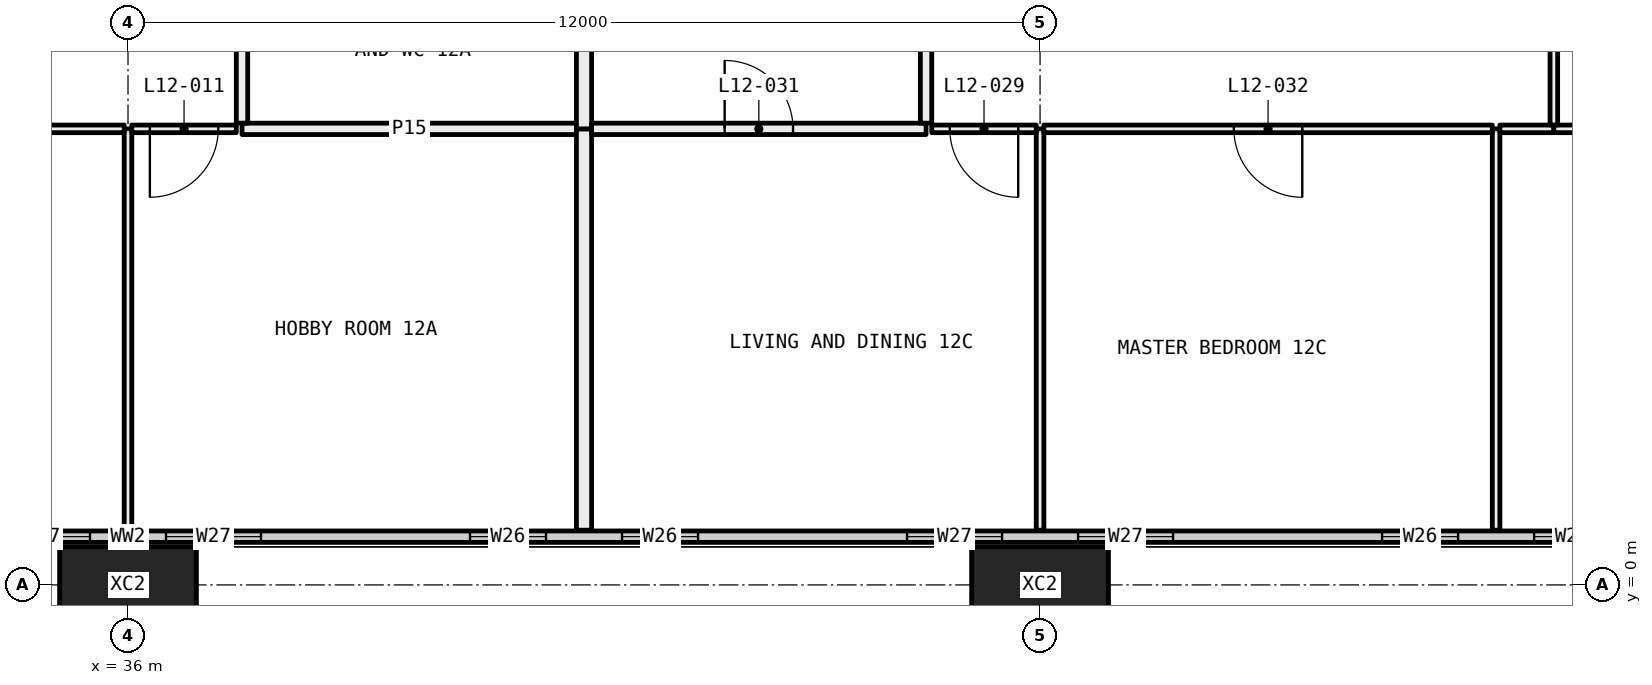
"""IFC4 building model, lengths in metres.
Left out: names, types, materials, properties, quantities, classifications, styles, units other than length and angle.
Written with IfcOpenShell. Run it as: python <this file> out.ifc"""

import sys

from ifc_helpers import new_model, si_unit, direction, frame, frame_2d, origin, origin_2d, place, context, subcontext, project, spatial, rectangle, hollow_rectangle, extrude, element, fill, save


model = new_model("IFC4")
c1 = context("Model", 3, precision=1e-05, world=origin(), true_north=direction((0.0, 1.0)))
c2 = subcontext(c1, "Body", "Model", "MODEL_VIEW")
j1 = project(units=[si_unit("LENGTHUNIT", "METRE"), si_unit("PLANEANGLEUNIT", "RADIAN")], contexts=[c1])
p1 = place(None, origin())
s1 = spatial("IfcSite", under=j1, at=p1, CompositionType="ELEMENT")
p2 = place(p1, origin())
s2 = spatial("IfcBuilding", under=s1, at=p2, CompositionType="ELEMENT")
p3 = place(p2, frame((0.0, 0.0, 54.15)))
s3 = spatial("IfcBuildingStorey", under=s2, at=p3, CompositionType="ELEMENT", Elevation=54.15)
for number, where, z_axis, x_axis in (
    (1, (36.0, 0.0, -0.4), (0.0, 0.0, 1.0), (1.0, 0.0, 0.0)),
    (2, (48.0, 0.0, -0.4), (0.0, 0.0, 1.0), (1.0, 0.0, 0.0)),
):
    element("IfcColumn", number, at=place(p3, frame(where, z_axis=z_axis, x_axis=x_axis)), inside=s3, PredefinedType="COLUMN", context=c2, shape_type="SweptSolid", body=[
        extrude(hollow_rectangle(XDim=1.8, YDim=1.0, WallThickness=0.07, at=origin_2d()), origin(), (0.0, 0.0, 1.0), 3.45),
    ])
p4 = place(p3, frame((6.56, 0.635, 0.0), z_axis=(0.0, 0.0, 1.0), x_axis=(1.0, 0.0, 0.0)))
e3 = element("IfcWall", 3, at=p4, inside=s3, PredefinedType="ELEMENTEDWALL", context=c2, shape_type="SweptSolid", body=[
    extrude(rectangle(XDim=58.88, YDim=0.15, at=frame_2d((29.44, 0.0))), origin(), (0.0, 0.0, 1.0), 3.05),
])
p5 = place(p4, frame((0.44, 0.0, 0.45)))
e4 = element("IfcOpeningElement", 4, at=p5, cuts=e3, PredefinedType="OPENING", context=c2, shape_type="SweptSolid", body=[
    extrude(rectangle(XDim=4.5, YDim=2.55, at=frame_2d((2.25, 1.275))), frame((0.0, 0.085, 0.0), z_axis=(0.0, -1.0, 0.0), x_axis=(1.0, 0.0, 0.0)), (0.0, 0.0, 1.0), 0.17),
])
p6 = place(p4, frame((5.94, 0.0, 0.45)))
e5 = element("IfcOpeningElement", 5, at=p6, cuts=e3, PredefinedType="OPENING", context=c2, shape_type="SweptSolid", body=[
    extrude(rectangle(XDim=1.25, YDim=2.55, at=frame_2d((0.625, 1.275))), frame((0.0, 0.085, 0.0), z_axis=(0.0, -1.0, 0.0), x_axis=(1.0, 0.0, 0.0)), (0.0, 0.0, 1.0), 0.17),
])
p7 = place(p4, frame((9.94, 0.0, 0.45)))
e6 = element("IfcOpeningElement", 6, at=p7, cuts=e3, PredefinedType="OPENING", context=c2, shape_type="SweptSolid", body=[
    extrude(rectangle(XDim=1.0, YDim=2.55, at=frame_2d((0.5, 1.275))), frame((0.0, 0.085, 0.0), z_axis=(0.0, -1.0, 0.0), x_axis=(1.0, 0.0, 0.0)), (0.0, 0.0, 1.0), 0.17),
])
p8 = place(p4, frame((11.94, 0.0, 0.45)))
e7 = element("IfcOpeningElement", 7, at=p8, cuts=e3, PredefinedType="OPENING", context=c2, shape_type="SweptSolid", body=[
    extrude(rectangle(XDim=1.0, YDim=2.55, at=frame_2d((0.5, 1.275))), frame((0.0, 0.085, 0.0), z_axis=(0.0, -1.0, 0.0), x_axis=(1.0, 0.0, 0.0)), (0.0, 0.0, 1.0), 0.17),
])
p9 = place(p4, frame((15.69, 0.0, 0.45)))
e8 = element("IfcOpeningElement", 8, at=p9, cuts=e3, PredefinedType="OPENING", context=c2, shape_type="SweptSolid", body=[
    extrude(rectangle(XDim=1.25, YDim=2.55, at=frame_2d((0.625, 1.275))), frame((0.0, 0.085, 0.0), z_axis=(0.0, -1.0, 0.0), x_axis=(1.0, 0.0, 0.0)), (0.0, 0.0, 1.0), 0.17),
])
p10 = place(p4, frame((17.94, 0.0, 0.45)))
e9 = element("IfcOpeningElement", 9, at=p10, cuts=e3, PredefinedType="OPENING", context=c2, shape_type="SweptSolid", body=[
    extrude(rectangle(XDim=1.25, YDim=2.55, at=frame_2d((0.625, 1.275))), frame((0.0, 0.085, 0.0), z_axis=(0.0, -1.0, 0.0), x_axis=(1.0, 0.0, 0.0)), (0.0, 0.0, 1.0), 0.17),
])
p11 = place(p4, frame((21.94, 0.0, 0.45)))
e10 = element("IfcOpeningElement", 10, at=p11, cuts=e3, PredefinedType="OPENING", context=c2, shape_type="SweptSolid", body=[
    extrude(rectangle(XDim=1.0, YDim=2.55, at=frame_2d((0.5, 1.275))), frame((0.0, 0.085, 0.0), z_axis=(0.0, -1.0, 0.0), x_axis=(1.0, 0.0, 0.0)), (0.0, 0.0, 1.0), 0.17),
])
p12 = place(p4, frame((23.94, 0.0, 0.45)))
e11 = element("IfcOpeningElement", 11, at=p12, cuts=e3, PredefinedType="OPENING", context=c2, shape_type="SweptSolid", body=[
    extrude(rectangle(XDim=1.0, YDim=2.55, at=frame_2d((0.5, 1.275))), frame((0.0, 0.085, 0.0), z_axis=(0.0, -1.0, 0.0), x_axis=(1.0, 0.0, 0.0)), (0.0, 0.0, 1.0), 0.17),
])
p13 = place(p4, frame((27.69, 0.0, 0.45)))
e12 = element("IfcOpeningElement", 12, at=p13, cuts=e3, PredefinedType="OPENING", context=c2, shape_type="SweptSolid", body=[
    extrude(rectangle(XDim=1.25, YDim=2.55, at=frame_2d((0.625, 1.275))), frame((0.0, 0.085, 0.0), z_axis=(0.0, -1.0, 0.0), x_axis=(1.0, 0.0, 0.0)), (0.0, 0.0, 1.0), 0.17),
])
p14 = place(p4, frame((29.94, 0.0, 0.45)))
e13 = element("IfcOpeningElement", 13, at=p14, cuts=e3, PredefinedType="OPENING", context=c2, shape_type="SweptSolid", body=[
    extrude(rectangle(XDim=1.25, YDim=2.55, at=frame_2d((0.625, 1.275))), frame((0.0, 0.085, 0.0), z_axis=(0.0, -1.0, 0.0), x_axis=(1.0, 0.0, 0.0)), (0.0, 0.0, 1.0), 0.17),
])
p15 = place(p4, frame((33.94, 0.0, 0.45)))
e14 = element("IfcOpeningElement", 14, at=p15, cuts=e3, PredefinedType="OPENING", context=c2, shape_type="SweptSolid", body=[
    extrude(rectangle(XDim=1.0, YDim=2.55, at=frame_2d((0.5, 1.275))), frame((0.0, 0.085, 0.0), z_axis=(0.0, -1.0, 0.0), x_axis=(1.0, 0.0, 0.0)), (0.0, 0.0, 1.0), 0.17),
])
p16 = place(p4, frame((35.94, 0.0, 0.45)))
e15 = element("IfcOpeningElement", 15, at=p16, cuts=e3, PredefinedType="OPENING", context=c2, shape_type="SweptSolid", body=[
    extrude(rectangle(XDim=1.0, YDim=2.55, at=frame_2d((0.5, 1.275))), frame((0.0, 0.085, 0.0), z_axis=(0.0, -1.0, 0.0), x_axis=(1.0, 0.0, 0.0)), (0.0, 0.0, 1.0), 0.17),
])
p17 = place(p4, frame((39.69, 0.0, 0.45)))
e16 = element("IfcOpeningElement", 16, at=p17, cuts=e3, PredefinedType="OPENING", context=c2, shape_type="SweptSolid", body=[
    extrude(rectangle(XDim=1.25, YDim=2.55, at=frame_2d((0.625, 1.275))), frame((0.0, 0.085, 0.0), z_axis=(0.0, -1.0, 0.0), x_axis=(1.0, 0.0, 0.0)), (0.0, 0.0, 1.0), 0.17),
])
p18 = place(p4, frame((41.94, 0.0, 0.45)))
e17 = element("IfcOpeningElement", 17, at=p18, cuts=e3, PredefinedType="OPENING", context=c2, shape_type="SweptSolid", body=[
    extrude(rectangle(XDim=1.25, YDim=2.55, at=frame_2d((0.625, 1.275))), frame((0.0, 0.085, 0.0), z_axis=(0.0, -1.0, 0.0), x_axis=(1.0, 0.0, 0.0)), (0.0, 0.0, 1.0), 0.17),
])
p19 = place(p4, frame((45.94, 0.0, 0.45)))
e18 = element("IfcOpeningElement", 18, at=p19, cuts=e3, PredefinedType="OPENING", context=c2, shape_type="SweptSolid", body=[
    extrude(rectangle(XDim=1.0, YDim=2.55, at=frame_2d((0.5, 1.275))), frame((0.0, 0.085, 0.0), z_axis=(0.0, -1.0, 0.0), x_axis=(1.0, 0.0, 0.0)), (0.0, 0.0, 1.0), 0.17),
])
p20 = place(p4, frame((47.94, 0.0, 0.45)))
e19 = element("IfcOpeningElement", 19, at=p20, cuts=e3, PredefinedType="OPENING", context=c2, shape_type="SweptSolid", body=[
    extrude(rectangle(XDim=1.0, YDim=2.55, at=frame_2d((0.5, 1.275))), frame((0.0, 0.085, 0.0), z_axis=(0.0, -1.0, 0.0), x_axis=(1.0, 0.0, 0.0)), (0.0, 0.0, 1.0), 0.17),
])
p21 = place(p4, frame((51.69, 0.0, 0.45)))
e20 = element("IfcOpeningElement", 20, at=p21, cuts=e3, PredefinedType="OPENING", context=c2, shape_type="SweptSolid", body=[
    extrude(rectangle(XDim=1.25, YDim=2.55, at=frame_2d((0.625, 1.275))), frame((0.0, 0.085, 0.0), z_axis=(0.0, -1.0, 0.0), x_axis=(1.0, 0.0, 0.0)), (0.0, 0.0, 1.0), 0.17),
])
p22 = place(p4, frame((53.94, 0.0, 0.45)))
e21 = element("IfcOpeningElement", 21, at=p22, cuts=e3, PredefinedType="OPENING", context=c2, shape_type="SweptSolid", body=[
    extrude(rectangle(XDim=4.5, YDim=2.55, at=frame_2d((2.25, 1.275))), frame((0.0, 0.085, 0.0), z_axis=(0.0, -1.0, 0.0), x_axis=(1.0, 0.0, 0.0)), (0.0, 0.0, 1.0), 0.17),
])
p23 = place(p3, frame((36.0, 0.72, 0.0), z_axis=(0.0, 0.0, 1.0), x_axis=(0.0, 1.0, 0.0)))
e22 = element("IfcWall", 22, at=p23, inside=s3, PredefinedType="PARTITIONING", context=c2, shape_type="SweptSolid", body=[
    extrude(rectangle(XDim=5.28, YDim=0.1, at=frame_2d((2.64, 0.0))), origin(), (0.0, 0.0, 1.0), 2.45),
])
p24 = place(p3, frame((35.95, 6.0, 0.0), z_axis=(0.0, 0.0, 1.0), x_axis=(-1.0, 0.0, 0.0)))
e23 = element("IfcWall", 23, at=p24, inside=s3, PredefinedType="PARTITIONING", context=c2, shape_type="SweptSolid", body=[
    extrude(rectangle(XDim=5.9, YDim=0.1, at=frame_2d((2.95, 0.0))), origin(), (0.0, 0.0, 1.0), 2.45),
])
p25 = place(p24, frame((2.5, 0.0, 0.0)))
e24 = element("IfcOpeningElement", 24, at=p25, cuts=e23, PredefinedType="OPENING", context=c2, shape_type="SweptSolid", body=[
    extrude(rectangle(XDim=0.9, YDim=2.1, at=frame_2d((0.45, 1.05))), frame((0.0, 0.06, 0.0), z_axis=(0.0, -1.0, 0.0), x_axis=(1.0, 0.0, 0.0)), (0.0, 0.0, 1.0), 0.12),
])
p26 = place(p3, frame((37.425, 6.0, 0.0), z_axis=(0.0, 0.0, 1.0), x_axis=(-1.0, 0.0, 0.0)))
e25 = element("IfcWall", 25, at=p26, inside=s3, PredefinedType="PARTITIONING", context=c2, shape_type="SweptSolid", body=[
    extrude(rectangle(XDim=1.375, YDim=0.1, at=frame_2d((0.688, 0.0))), origin(), (0.0, 0.0, 1.0), 2.45),
])
p27 = place(p26, frame((0.238, 0.0, 0.0)))
e26 = element("IfcOpeningElement", 26, at=p27, cuts=e25, PredefinedType="OPENING", context=c2, shape_type="SweptSolid", body=[
    extrude(rectangle(XDim=0.9, YDim=2.1, at=frame_2d((0.45, 1.05))), frame((0.0, 0.06, 0.0), z_axis=(0.0, -1.0, 0.0), x_axis=(1.0, 0.0, 0.0)), (0.0, 0.0, 1.0), 0.12),
])
p28 = place(p3, frame((41.9, 6.0, 0.0), z_axis=(0.0, 0.0, 1.0), x_axis=(-1.0, 0.0, 0.0)))
e27 = element("IfcWall", 27, at=p28, inside=s3, PredefinedType="PARTITIONING", context=c2, shape_type="SweptSolid", body=[
    extrude(rectangle(XDim=4.4, YDim=0.15, at=frame_2d((2.2, 0.0))), origin(), (0.0, 0.0, 1.0), 3.05),
])
p29 = place(p3, frame((42.0, 0.72, 0.0), z_axis=(0.0, 0.0, 1.0), x_axis=(0.0, 1.0, 0.0)))
e28 = element("IfcWall", 28, at=p29, inside=s3, PredefinedType="PARTITIONING", context=c2, shape_type="SweptSolid", body=[
    extrude(rectangle(XDim=5.28, YDim=0.2, at=frame_2d((2.64, 0.0))), origin(), (0.0, 0.0, 1.0), 3.05),
])
p30 = place(p3, frame((37.5, 6.075, 0.0), z_axis=(0.0, 0.0, 1.0), x_axis=(0.0, 1.0, 0.0)))
e29 = element("IfcWall", 29, at=p30, inside=s3, PredefinedType="PARTITIONING", context=c2, shape_type="SweptSolid", body=[
    extrude(rectangle(XDim=2.925, YDim=0.15, at=frame_2d((1.462, 0.0))), origin(), (0.0, 0.0, 1.0), 3.05),
])
p31 = place(p30, frame((1.012, 0.0, 0.0)))
e30 = element("IfcOpeningElement", 30, at=p31, cuts=e29, PredefinedType="OPENING", context=c2, shape_type="SweptSolid", body=[
    extrude(rectangle(XDim=0.9, YDim=2.1, at=frame_2d((0.45, 1.05))), frame((0.0, 0.085, 0.0), z_axis=(0.0, -1.0, 0.0), x_axis=(1.0, 0.0, 0.0)), (0.0, 0.0, 1.0), 0.17),
])
p32 = place(p3, frame((42.0, 6.0, 0.0), z_axis=(0.0, 0.0, 1.0), x_axis=(0.0, 1.0, 0.0)))
e31 = element("IfcWall", 31, at=p32, inside=s3, PredefinedType="PARTITIONING", context=c2, shape_type="SweptSolid", body=[
    extrude(rectangle(XDim=3.0, YDim=0.2, at=frame_2d((1.5, 0.0))), origin(), (0.0, 0.0, 1.0), 3.05),
])
p33 = place(p3, frame((48.0, 0.72, 0.0), z_axis=(0.0, 0.0, 1.0), x_axis=(0.0, 1.0, 0.0)))
e32 = element("IfcWall", 32, at=p33, inside=s3, PredefinedType="PARTITIONING", context=c2, shape_type="SweptSolid", body=[
    extrude(rectangle(XDim=5.28, YDim=0.1, at=frame_2d((2.64, 0.0))), origin(), (0.0, 0.0, 1.0), 2.45),
])
p34 = place(p3, frame((46.5, 6.0, 0.0), z_axis=(0.0, 0.0, 1.0), x_axis=(-1.0, 0.0, 0.0)))
e33 = element("IfcWall", 33, at=p34, inside=s3, PredefinedType="PARTITIONING", context=c2, shape_type="SweptSolid", body=[
    extrude(rectangle(XDim=4.4, YDim=0.15, at=frame_2d((2.2, 0.0))), origin(), (0.0, 0.0, 1.0), 3.05),
])
p35 = place(p34, frame((1.75, 0.0, 0.0)))
e34 = element("IfcOpeningElement", 34, at=p35, cuts=e33, PredefinedType="OPENING", context=c2, shape_type="SweptSolid", body=[
    extrude(rectangle(XDim=0.9, YDim=2.1, at=frame_2d((0.45, 1.05))), frame((0.0, 0.085, 0.0), z_axis=(0.0, -1.0, 0.0), x_axis=(1.0, 0.0, 0.0)), (0.0, 0.0, 1.0), 0.17),
])
p36 = place(p3, frame((47.95, 6.0, 0.0), z_axis=(0.0, 0.0, 1.0), x_axis=(-1.0, 0.0, 0.0)))
e35 = element("IfcWall", 35, at=p36, inside=s3, PredefinedType="PARTITIONING", context=c2, shape_type="SweptSolid", body=[
    extrude(rectangle(XDim=1.375, YDim=0.1, at=frame_2d((0.688, 0.0))), origin(), (0.0, 0.0, 1.0), 2.45),
])
p37 = place(p36, frame((0.238, 0.0, 0.0)))
e36 = element("IfcOpeningElement", 36, at=p37, cuts=e35, PredefinedType="OPENING", context=c2, shape_type="SweptSolid", body=[
    extrude(rectangle(XDim=0.9, YDim=2.1, at=frame_2d((0.45, 1.05))), frame((0.0, 0.06, 0.0), z_axis=(0.0, -1.0, 0.0), x_axis=(1.0, 0.0, 0.0)), (0.0, 0.0, 1.0), 0.12),
])
p38 = place(p3, frame((54.0, 0.72, 0.0), z_axis=(0.0, 0.0, 1.0), x_axis=(0.0, 1.0, 0.0)))
e37 = element("IfcWall", 37, at=p38, inside=s3, PredefinedType="PARTITIONING", context=c2, shape_type="SweptSolid", body=[
    extrude(rectangle(XDim=5.28, YDim=0.1, at=frame_2d((2.64, 0.0))), origin(), (0.0, 0.0, 1.0), 3.05),
])
p39 = place(p3, frame((53.95, 6.0, 0.0), z_axis=(0.0, 0.0, 1.0), x_axis=(-1.0, 0.0, 0.0)))
e38 = element("IfcWall", 38, at=p39, inside=s3, PredefinedType="PARTITIONING", context=c2, shape_type="SweptSolid", body=[
    extrude(rectangle(XDim=5.9, YDim=0.1, at=frame_2d((2.95, 0.0))), origin(), (0.0, 0.0, 1.0), 2.45),
])
p40 = place(p39, frame((2.5, 0.0, 0.0)))
e39 = element("IfcOpeningElement", 39, at=p40, cuts=e38, PredefinedType="OPENING", context=c2, shape_type="SweptSolid", body=[
    extrude(rectangle(XDim=0.9, YDim=2.1, at=frame_2d((0.45, 1.05))), frame((0.0, 0.06, 0.0), z_axis=(0.0, -1.0, 0.0), x_axis=(1.0, 0.0, 0.0)), (0.0, 0.0, 1.0), 0.12),
])
p41 = place(p3, frame((54.76, 6.0, 0.0), z_axis=(0.0, 0.0, 1.0), x_axis=(-1.0, 0.0, 0.0)))
e40 = element("IfcWall", 40, at=p41, inside=s3, PredefinedType="PARTITIONING", context=c2, shape_type="SweptSolid", body=[
    extrude(rectangle(XDim=0.71, YDim=0.1, at=frame_2d((0.355, 0.0))), origin(), (0.0, 0.0, 1.0), 3.05),
])
p42 = place(p3, frame((59.95, 6.0, 0.0), z_axis=(0.0, 0.0, 1.0), x_axis=(-1.0, 0.0, 0.0)))
e41 = element("IfcWall", 41, at=p42, inside=s3, PredefinedType="PARTITIONING", context=c2, shape_type="SweptSolid", body=[
    extrude(rectangle(XDim=5.19, YDim=0.1, at=frame_2d((2.595, 0.0))), origin(), (0.0, 0.0, 1.0), 2.45),
])
p43 = place(p42, frame((2.145, 0.0, 0.0)))
e42 = element("IfcOpeningElement", 42, at=p43, cuts=e41, PredefinedType="OPENING", context=c2, shape_type="SweptSolid", body=[
    extrude(rectangle(XDim=0.9, YDim=2.1, at=frame_2d((0.45, 1.05))), frame((0.0, 0.06, 0.0), z_axis=(0.0, -1.0, 0.0), x_axis=(1.0, 0.0, 0.0)), (0.0, 0.0, 1.0), 0.12),
])
p44 = place(p3, frame((46.5, 6.075, 0.0), z_axis=(0.0, 0.0, 1.0), x_axis=(0.0, 1.0, 0.0)))
e43 = element("IfcWall", 43, at=p44, inside=s3, PredefinedType="PARTITIONING", context=c2, shape_type="SweptSolid", body=[
    extrude(rectangle(XDim=2.85, YDim=0.15, at=frame_2d((1.425, 0.0))), origin(), (0.0, 0.0, 1.0), 3.05),
])
p45 = place(p3, frame((54.76, 6.05, 0.0), z_axis=(0.0, 0.0, 1.0), x_axis=(0.0, 1.0, 0.0)))
e44 = element("IfcWall", 44, at=p45, inside=s3, PredefinedType="PARTITIONING", context=c2, shape_type="SweptSolid", body=[
    extrude(rectangle(XDim=5.95, YDim=0.1, at=frame_2d((2.975, 0.0))), origin(), (0.0, 0.0, 1.0), 2.45),
])
p46 = place(p13, origin())
e45 = element("IfcWindow", 45, at=p46, inside=s3, PartitioningType="SINGLE_PANEL", PredefinedType="WINDOW", context=c2, shape_type="SweptSolid", body=[
    extrude(rectangle(XDim=1.25, YDim=2.55, at=frame_2d((0.625, 1.275))), frame((0.0, 0.03, 0.0), z_axis=(0.0, -1.0, 0.0), x_axis=(1.0, 0.0, 0.0)), (0.0, 0.0, 1.0), 0.06),
])
fill(e12, e45)
p47 = place(p14, origin())
e46 = element("IfcWindow", 46, at=p47, inside=s3, PartitioningType="SINGLE_PANEL", PredefinedType="WINDOW", context=c2, shape_type="SweptSolid", body=[
    extrude(rectangle(XDim=1.25, YDim=2.55, at=frame_2d((0.625, 1.275))), frame((0.0, 0.03, 0.0), z_axis=(0.0, -1.0, 0.0), x_axis=(1.0, 0.0, 0.0)), (0.0, 0.0, 1.0), 0.06),
])
fill(e13, e46)
p48 = place(p15, origin())
e47 = element("IfcWindow", 47, at=p48, inside=s3, PartitioningType="SINGLE_PANEL", PredefinedType="WINDOW", context=c2, shape_type="SweptSolid", body=[
    extrude(rectangle(XDim=1.0, YDim=2.55, at=frame_2d((0.5, 1.275))), frame((0.0, 0.03, 0.0), z_axis=(0.0, -1.0, 0.0), x_axis=(1.0, 0.0, 0.0)), (0.0, 0.0, 1.0), 0.06),
])
fill(e14, e47)
p49 = place(p16, origin())
e48 = element("IfcWindow", 48, at=p49, inside=s3, PartitioningType="SINGLE_PANEL", PredefinedType="WINDOW", context=c2, shape_type="SweptSolid", body=[
    extrude(rectangle(XDim=1.0, YDim=2.55, at=frame_2d((0.5, 1.275))), frame((0.0, 0.03, 0.0), z_axis=(0.0, -1.0, 0.0), x_axis=(1.0, 0.0, 0.0)), (0.0, 0.0, 1.0), 0.06),
])
fill(e15, e48)
p50 = place(p17, origin())
e49 = element("IfcWindow", 49, at=p50, inside=s3, PartitioningType="SINGLE_PANEL", PredefinedType="WINDOW", context=c2, shape_type="SweptSolid", body=[
    extrude(rectangle(XDim=1.25, YDim=2.55, at=frame_2d((0.625, 1.275))), frame((0.0, 0.03, 0.0), z_axis=(0.0, -1.0, 0.0), x_axis=(1.0, 0.0, 0.0)), (0.0, 0.0, 1.0), 0.06),
])
fill(e16, e49)
p51 = place(p18, origin())
e50 = element("IfcWindow", 50, at=p51, inside=s3, PartitioningType="SINGLE_PANEL", PredefinedType="WINDOW", context=c2, shape_type="SweptSolid", body=[
    extrude(rectangle(XDim=1.25, YDim=2.55, at=frame_2d((0.625, 1.275))), frame((0.0, 0.03, 0.0), z_axis=(0.0, -1.0, 0.0), x_axis=(1.0, 0.0, 0.0)), (0.0, 0.0, 1.0), 0.06),
])
fill(e17, e50)
p52 = place(p19, origin())
e51 = element("IfcWindow", 51, at=p52, inside=s3, PartitioningType="SINGLE_PANEL", PredefinedType="WINDOW", context=c2, shape_type="SweptSolid", body=[
    extrude(rectangle(XDim=1.0, YDim=2.55, at=frame_2d((0.5, 1.275))), frame((0.0, 0.03, 0.0), z_axis=(0.0, -1.0, 0.0), x_axis=(1.0, 0.0, 0.0)), (0.0, 0.0, 1.0), 0.06),
])
fill(e18, e51)
p53 = place(p20, origin())
e52 = element("IfcWindow", 52, at=p53, inside=s3, PartitioningType="SINGLE_PANEL", PredefinedType="WINDOW", context=c2, shape_type="SweptSolid", body=[
    extrude(rectangle(XDim=1.0, YDim=2.55, at=frame_2d((0.5, 1.275))), frame((0.0, 0.03, 0.0), z_axis=(0.0, -1.0, 0.0), x_axis=(1.0, 0.0, 0.0)), (0.0, 0.0, 1.0), 0.06),
])
fill(e19, e52)
p54 = place(p27, origin())
e53 = element("IfcDoor", 53, at=p54, inside=s3, OperationType="SINGLE_SWING_LEFT", PredefinedType="DOOR", context=c2, shape_type="SweptSolid", body=[
    extrude(rectangle(XDim=0.9, YDim=2.1, at=frame_2d((0.45, 1.05))), frame((0.0, 0.025, 0.0), z_axis=(0.0, -1.0, 0.0), x_axis=(1.0, 0.0, 0.0)), (0.0, 0.0, 1.0), 0.05),
])
fill(e26, e53)
p55 = place(p37, origin())
e54 = element("IfcDoor", 54, at=p55, inside=s3, OperationType="SINGLE_SWING_RIGHT", PredefinedType="DOOR", context=c2, shape_type="SweptSolid", body=[
    extrude(rectangle(XDim=0.9, YDim=2.1, at=frame_2d((0.45, 1.05))), frame((0.0, 0.025, 0.0), z_axis=(0.0, -1.0, 0.0), x_axis=(1.0, 0.0, 0.0)), (0.0, 0.0, 1.0), 0.05),
])
fill(e36, e54)
p56 = place(p35, frame((0.9, 0.0, 0.0), x_axis=(-1.0, 0.0, 0.0)))
e55 = element("IfcDoor", 55, at=p56, inside=s3, OperationType="SINGLE_SWING_RIGHT", PredefinedType="DOOR", context=c2, shape_type="SweptSolid", body=[
    extrude(rectangle(XDim=0.9, YDim=2.1, at=frame_2d((0.45, 1.05))), frame((0.0, 0.025, 0.0), z_axis=(0.0, -1.0, 0.0), x_axis=(1.0, 0.0, 0.0)), (0.0, 0.0, 1.0), 0.05),
])
fill(e34, e55)
p57 = place(p40, origin())
e56 = element("IfcDoor", 56, at=p57, inside=s3, OperationType="SINGLE_SWING_RIGHT", PredefinedType="DOOR", context=c2, shape_type="SweptSolid", body=[
    extrude(rectangle(XDim=0.9, YDim=2.1, at=frame_2d((0.45, 1.05))), frame((0.0, 0.025, 0.0), z_axis=(0.0, -1.0, 0.0), x_axis=(1.0, 0.0, 0.0)), (0.0, 0.0, 1.0), 0.05),
])
fill(e39, e56)
save(model, sys.argv[1])
